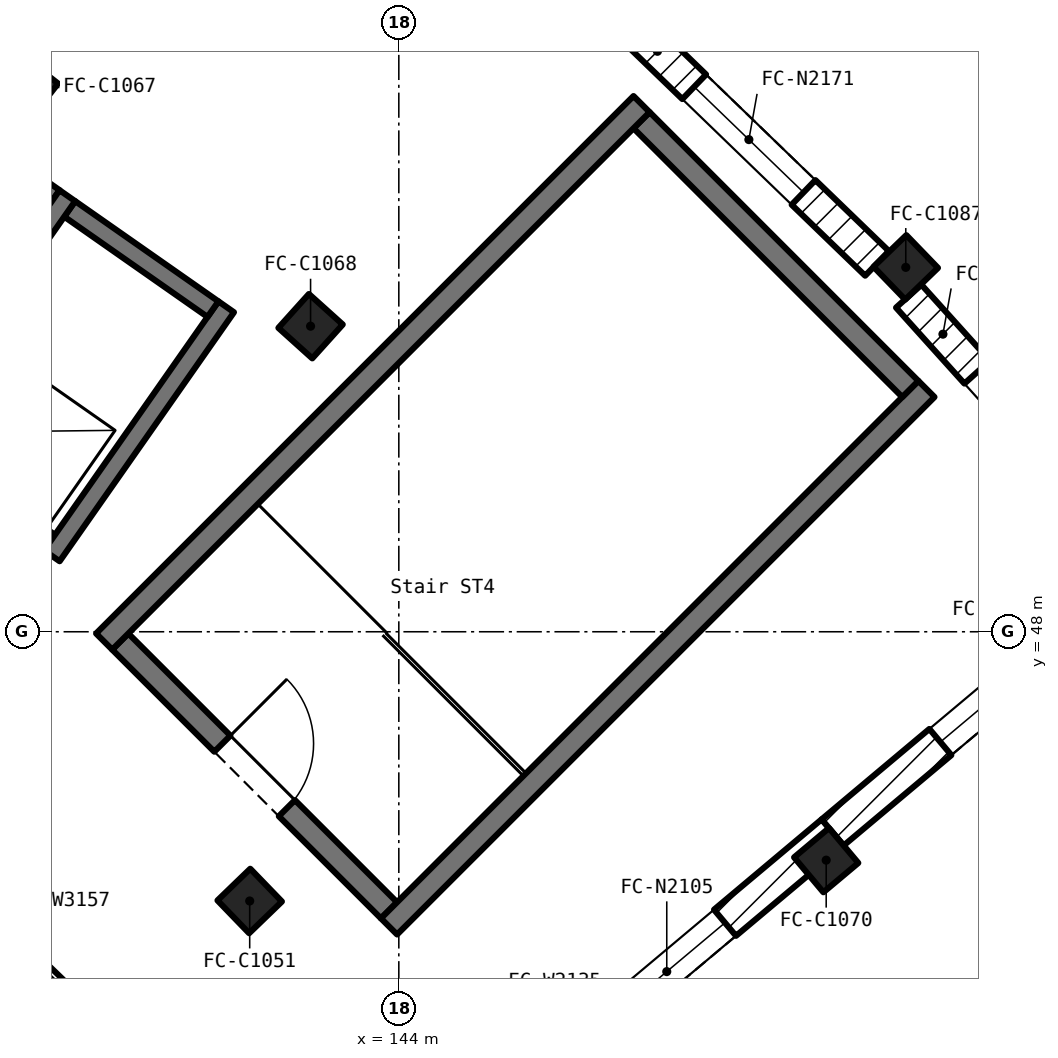
"""IFC4 building model, lengths in metres.
Left out: names, types, materials, properties, quantities, classifications, styles, units other than length and angle.
Written with IfcOpenShell. Run it as: python <this file> out.ifc"""

import sys

from ifc_helpers import new_model, si_unit, direction, frame, frame_2d, origin, origin_2d, place, context, subcontext, project, spatial, rectangle, extrude, element, fill, save


model = new_model("IFC4")
c1 = context("Model", 3, precision=1e-05, world=origin(), true_north=direction((0.0, 1.0)))
c2 = subcontext(c1, "Body", "Model", "MODEL_VIEW")
j1 = project(units=[si_unit("LENGTHUNIT", "METRE"), si_unit("PLANEANGLEUNIT", "RADIAN")], contexts=[c1])
p1 = place(None, origin())
s1 = spatial("IfcSite", under=j1, at=p1, CompositionType="ELEMENT")
p2 = place(p1, origin())
s2 = spatial("IfcBuilding", under=s1, at=p2, CompositionType="ELEMENT")
p3 = place(p2, frame((0.0, 0.0, 22.5)))
s3 = spatial("IfcBuildingStorey", under=s2, at=p3, CompositionType="ELEMENT", Elevation=22.5)
for number, where, z_axis, x_axis in (
    (1, (142.038, 44.458, 0.0), (0.0, 0.0, 1.0), (0.695, -0.719, 0.0)),
    (2, (139.096, 55.161, 0.0), (0.0, 0.0, 1.0), (0.788, -0.616, 0.0)),
    (3, (142.839, 52.02, 0.0), (0.0, 0.0, 1.0), (0.743, -0.669, 0.0)),
    (4, (149.623, 44.995, 0.0), (0.0, 0.0, 1.0), (0.643, -0.766, 0.0)),
    (5, (150.67, 52.794, 0.0), (0.0, 0.0, 1.0), (0.695, -0.719, 0.0)),
):
    element("IfcColumn", number, at=place(p3, frame(where, z_axis=z_axis, x_axis=x_axis)), inside=s3, PredefinedType="COLUMN", context=c2, shape_type="SweptSolid", body=[
        extrude(rectangle(XDim=0.6, YDim=0.6, at=origin_2d()), origin(), (0.0, 0.0, 1.0), 5.5),
    ])
p4 = place(p3, frame((145.342, 41.697, 0.0), z_axis=(0.0, 0.0, 1.0), x_axis=(0.766078586631, 0.642746916838, 0.0)))
e6 = element("IfcWall", 6, at=p4, inside=s3, PredefinedType="SOLIDWALL", context=c2, shape_type="SweptSolid", body=[
    extrude(rectangle(XDim=5.699, YDim=0.45, at=frame_2d((2.85, 0.0))), origin(), (0.0, 0.0, 1.0), 4.45),
])
p5 = place(p4, frame((1.85, 0.0, 1.0)))
e7 = element("IfcOpeningElement", 7, at=p5, cuts=e6, PredefinedType="OPENING", context=c2, shape_type="SweptSolid", body=[
    extrude(rectangle(XDim=2.0, YDim=2.8, at=frame_2d((1.0, 1.4))), frame((0.0, 0.237, 0.0), z_axis=(0.0, -1.0, 0.0), x_axis=(1.0, 0.0, 0.0)), (0.0, 0.0, 1.0), 0.474),
])
p6 = place(p3, frame((149.708, 45.36, 0.0), z_axis=(0.0, 0.0, 1.0), x_axis=(0.766086094987, 0.642737967657, 0.0)))
e8 = element("IfcWall", 8, at=p6, inside=s3, PredefinedType="SOLIDWALL", context=c2, shape_type="SweptSolid", body=[
    extrude(rectangle(XDim=5.7, YDim=0.45, at=frame_2d((2.85, 0.0))), origin(), (0.0, 0.0, 1.0), 4.45),
])
p7 = place(p6, frame((1.85, 0.0, 1.0)))
e9 = element("IfcOpeningElement", 9, at=p7, cuts=e8, PredefinedType="OPENING", context=c2, shape_type="SweptSolid", body=[
    extrude(rectangle(XDim=2.0, YDim=2.8, at=frame_2d((1.0, 1.4))), frame((0.0, 0.237, 0.0), z_axis=(0.0, -1.0, 0.0), x_axis=(1.0, 0.0, 0.0)), (0.0, 0.0, 1.0), 0.474),
])
p8 = place(p3, frame((146.919, 56.104, 0.0), z_axis=(0.0, 0.0, 1.0), x_axis=(0.719260611584, -0.694740363462, 0.0)))
e10 = element("IfcWall", 10, at=p8, inside=s3, PredefinedType="SOLIDWALL", context=c2, shape_type="SweptSolid", body=[
    extrude(rectangle(XDim=4.69, YDim=0.45, at=frame_2d((2.345, 0.0))), origin(), (0.0, 0.0, 1.0), 4.45),
])
p9 = place(p8, frame((1.345, 0.0, 1.0)))
e11 = element("IfcOpeningElement", 11, at=p9, cuts=e10, PredefinedType="OPENING", context=c2, shape_type="SweptSolid", body=[
    extrude(rectangle(XDim=2.0, YDim=2.8, at=frame_2d((1.0, 1.4))), frame((0.0, 0.237, 0.0), z_axis=(0.0, -1.0, 0.0), x_axis=(1.0, 0.0, 0.0)), (0.0, 0.0, 1.0), 0.474),
])
p10 = place(p3, frame((150.709, 52.415, 0.0), z_axis=(0.0, 0.0, 1.0), x_axis=(0.669007879878, -0.74325531055, 0.0)))
e12 = element("IfcWall", 12, at=p10, inside=s3, PredefinedType="SOLIDWALL", context=c2, shape_type="SweptSolid", body=[
    extrude(rectangle(XDim=4.689, YDim=0.45, at=frame_2d((2.344, 0.0))), origin(), (0.0, 0.0, 1.0), 4.45),
])
p11 = place(p10, frame((1.345, 0.0, 1.0)))
e13 = element("IfcOpeningElement", 13, at=p11, cuts=e12, PredefinedType="OPENING", context=c2, shape_type="SweptSolid", body=[
    extrude(rectangle(XDim=2.0, YDim=2.8, at=frame_2d((1.0, 1.4))), frame((0.0, 0.237, 0.0), z_axis=(0.0, -1.0, 0.0), x_axis=(1.0, 0.0, 0.0)), (0.0, 0.0, 1.0), 0.474),
])
p12 = place(p3, frame((140.335, 47.871, 0.0), z_axis=(0.0, 0.0, 1.0), x_axis=(0.707106781187, -0.707106781187, 0.0)))
e14 = element("IfcWall", 14, at=p12, inside=s3, PredefinedType="SOLIDWALL", context=c2, shape_type="SweptSolid", body=[
    extrude(rectangle(XDim=5.001, YDim=0.3, at=frame_2d((2.5, 0.0))), origin(), (0.0, 0.0, 1.0), 5.25),
])
p13 = place(p12, frame((1.9, 0.0, 0.0)))
e15 = element("IfcOpeningElement", 15, at=p13, cuts=e14, PredefinedType="OPENING", context=c2, shape_type="SweptSolid", body=[
    extrude(rectangle(XDim=1.2, YDim=2.1, at=frame_2d((0.6, 1.05))), frame((0.0, 0.162, 0.0), z_axis=(0.0, -1.0, 0.0), x_axis=(1.0, 0.0, 0.0)), (0.0, 0.0, 1.0), 0.324),
])
p14 = place(p3, frame((143.871, 44.123, 0.0), z_axis=(0.0, 0.0, 1.0), x_axis=(0.7070945738, 0.707118988363, 0.0)))
e16 = element("IfcWall", 16, at=p14, inside=s3, PredefinedType="SOLIDWALL", context=c2, shape_type="SweptSolid", body=[
    extrude(rectangle(XDim=10.0, YDim=0.3, at=frame_2d((5.0, 0.0))), origin(), (0.0, 0.0, 1.0), 5.25),
])
p15 = place(p3, frame((150.73, 51.194, 0.0), z_axis=(0.0, 0.0, 1.0), x_axis=(-0.707106781187, 0.707106781187, 0.0)))
e17 = element("IfcWall", 17, at=p15, inside=s3, PredefinedType="SOLIDWALL", context=c2, shape_type="SweptSolid", body=[
    extrude(rectangle(XDim=5.0, YDim=0.3, at=frame_2d((2.5, 0.0))), origin(), (0.0, 0.0, 1.0), 5.25),
])
p16 = place(p3, frame((147.194, 54.942, 0.0), z_axis=(0.0, 0.0, 1.0), x_axis=(-0.707118988363, -0.7070945738, 0.0)))
e18 = element("IfcWall", 18, at=p16, inside=s3, PredefinedType="SOLIDWALL", context=c2, shape_type="SweptSolid", body=[
    extrude(rectangle(XDim=10.0, YDim=0.3, at=frame_2d((5.0, 0.0))), origin(), (0.0, 0.0, 1.0), 5.25),
])
p17 = place(p3, frame((137.141, 50.605, 0.0), z_axis=(0.0, 0.0, 1.0), x_axis=(0.573572956461, 0.819154480923, 0.0)))
e19 = element("IfcWall", 19, at=p17, inside=s3, PredefinedType="SOLIDWALL", context=c2, shape_type="SweptSolid", body=[
    extrude(rectangle(XDim=4.0, YDim=0.25, at=frame_2d((2.0, 0.0))), origin(), (0.0, 0.0, 1.0), 5.25),
])
p18 = place(p3, frame((137.519, 50.492, 0.0), z_axis=(0.0, 0.0, 1.0), x_axis=(0.819366508838, -0.573270027295, 0.0)))
e20 = element("IfcWall", 20, at=p18, inside=s3, PredefinedType="SOLIDWALL", context=c2, shape_type="SweptSolid", body=[
    extrude(rectangle(XDim=2.301, YDim=0.25, at=frame_2d((1.15, 0.0))), origin(), (0.0, 0.0, 1.0), 5.25),
])
p19 = place(p18, frame((0.1, 0.0, 0.0)))
e21 = element("IfcOpeningElement", 21, at=p19, cuts=e20, PredefinedType="OPENING", context=c2, shape_type="SweptSolid", body=[
    extrude(rectangle(XDim=2.0, YDim=2.2, at=frame_2d((1.0, 1.1))), frame((0.0, 0.137, 0.0), z_axis=(0.0, -1.0, 0.0), x_axis=(1.0, 0.0, 0.0)), (0.0, 0.0, 1.0), 0.274),
])
p20 = place(p3, frame((139.435, 48.999, 0.0), z_axis=(0.0, 0.0, 1.0), x_axis=(0.57360163893, 0.819134396675, 0.0)))
e22 = element("IfcWall", 22, at=p20, inside=s3, PredefinedType="SOLIDWALL", context=c2, shape_type="SweptSolid", body=[
    extrude(rectangle(XDim=3.999, YDim=0.25, at=frame_2d((2.0, 0.0))), origin(), (0.0, 0.0, 1.0), 5.25),
])
p21 = place(p3, frame((141.555, 52.244, 0.0), z_axis=(0.0, 0.0, 1.0), x_axis=(-0.819316661421, 0.57334126689, 0.0)))
e23 = element("IfcWall", 23, at=p21, inside=s3, PredefinedType="SOLIDWALL", context=c2, shape_type="SweptSolid", body=[
    extrude(rectangle(XDim=2.301, YDim=0.25, at=frame_2d((1.15, 0.0))), origin(), (0.0, 0.0, 1.0), 5.25),
])
p22 = place(p3, frame((139.639, 53.737, 0.0), z_axis=(0.0, 0.0, 1.0), x_axis=(-0.573572956461, -0.819154480923, 0.0)))
e24 = element("IfcWall", 24, at=p22, inside=s3, PredefinedType="SOLIDWALL", context=c2, shape_type="SweptSolid", body=[
    extrude(rectangle(XDim=4.0, YDim=0.25, at=frame_2d((2.0, 0.0))), origin(), (0.0, 0.0, 1.0), 5.25),
])
p23 = place(p3, frame((137.811, 45.067, 0.0), z_axis=(0.0, 0.0, 1.0), x_axis=(0.719150966755, -0.694853860186, 0.0)))
e25 = element("IfcWall", 25, at=p23, inside=s3, PredefinedType="PARTITIONING", context=c2, shape_type="SweptSolid", body=[
    extrude(rectangle(XDim=3.376, YDim=0.1, at=frame_2d((1.688, 0.0))), origin(), (0.0, 0.0, 1.0), 4.35),
])
p24 = place(p5, origin())
e26 = element("IfcWindow", 26, at=p24, inside=s3, PartitioningType="DOUBLE_PANEL_VERTICAL", PredefinedType="WINDOW", context=c2, shape_type="SweptSolid", body=[
    extrude(rectangle(XDim=2.0, YDim=2.8, at=frame_2d((1.0, 1.4))), frame((0.0, 0.03, 0.0), z_axis=(0.0, -1.0, 0.0), x_axis=(1.0, 0.0, 0.0)), (0.0, 0.0, 1.0), 0.06),
])
fill(e7, e26)
p25 = place(p7, origin())
e27 = element("IfcWindow", 27, at=p25, inside=s3, PartitioningType="DOUBLE_PANEL_VERTICAL", PredefinedType="WINDOW", context=c2, shape_type="SweptSolid", body=[
    extrude(rectangle(XDim=2.0, YDim=2.8, at=frame_2d((1.0, 1.4))), frame((0.0, 0.03, 0.0), z_axis=(0.0, -1.0, 0.0), x_axis=(1.0, 0.0, 0.0)), (0.0, 0.0, 1.0), 0.06),
])
fill(e9, e27)
p26 = place(p9, origin())
e28 = element("IfcWindow", 28, at=p26, inside=s3, PartitioningType="DOUBLE_PANEL_VERTICAL", PredefinedType="WINDOW", context=c2, shape_type="SweptSolid", body=[
    extrude(rectangle(XDim=2.0, YDim=2.8, at=frame_2d((1.0, 1.4))), frame((0.0, 0.03, 0.0), z_axis=(0.0, -1.0, 0.0), x_axis=(1.0, 0.0, 0.0)), (0.0, 0.0, 1.0), 0.06),
])
fill(e11, e28)
p27 = place(p11, origin())
e29 = element("IfcWindow", 29, at=p27, inside=s3, PartitioningType="DOUBLE_PANEL_VERTICAL", PredefinedType="WINDOW", context=c2, shape_type="SweptSolid", body=[
    extrude(rectangle(XDim=2.0, YDim=2.8, at=frame_2d((1.0, 1.4))), frame((0.0, 0.03, 0.0), z_axis=(0.0, -1.0, 0.0), x_axis=(1.0, 0.0, 0.0)), (0.0, 0.0, 1.0), 0.06),
])
fill(e13, e29)
p28 = place(p13, origin())
e30 = element("IfcDoor", 30, at=p28, inside=s3, OperationType="SINGLE_SWING_LEFT", PredefinedType="DOOR", context=c2, shape_type="SweptSolid", body=[
    extrude(rectangle(XDim=1.2, YDim=2.1, at=frame_2d((0.6, 1.05))), frame((0.0, 0.025, 0.0), z_axis=(0.0, -1.0, 0.0), x_axis=(1.0, 0.0, 0.0)), (0.0, 0.0, 1.0), 0.05),
])
fill(e15, e30)
save(model, sys.argv[1])
